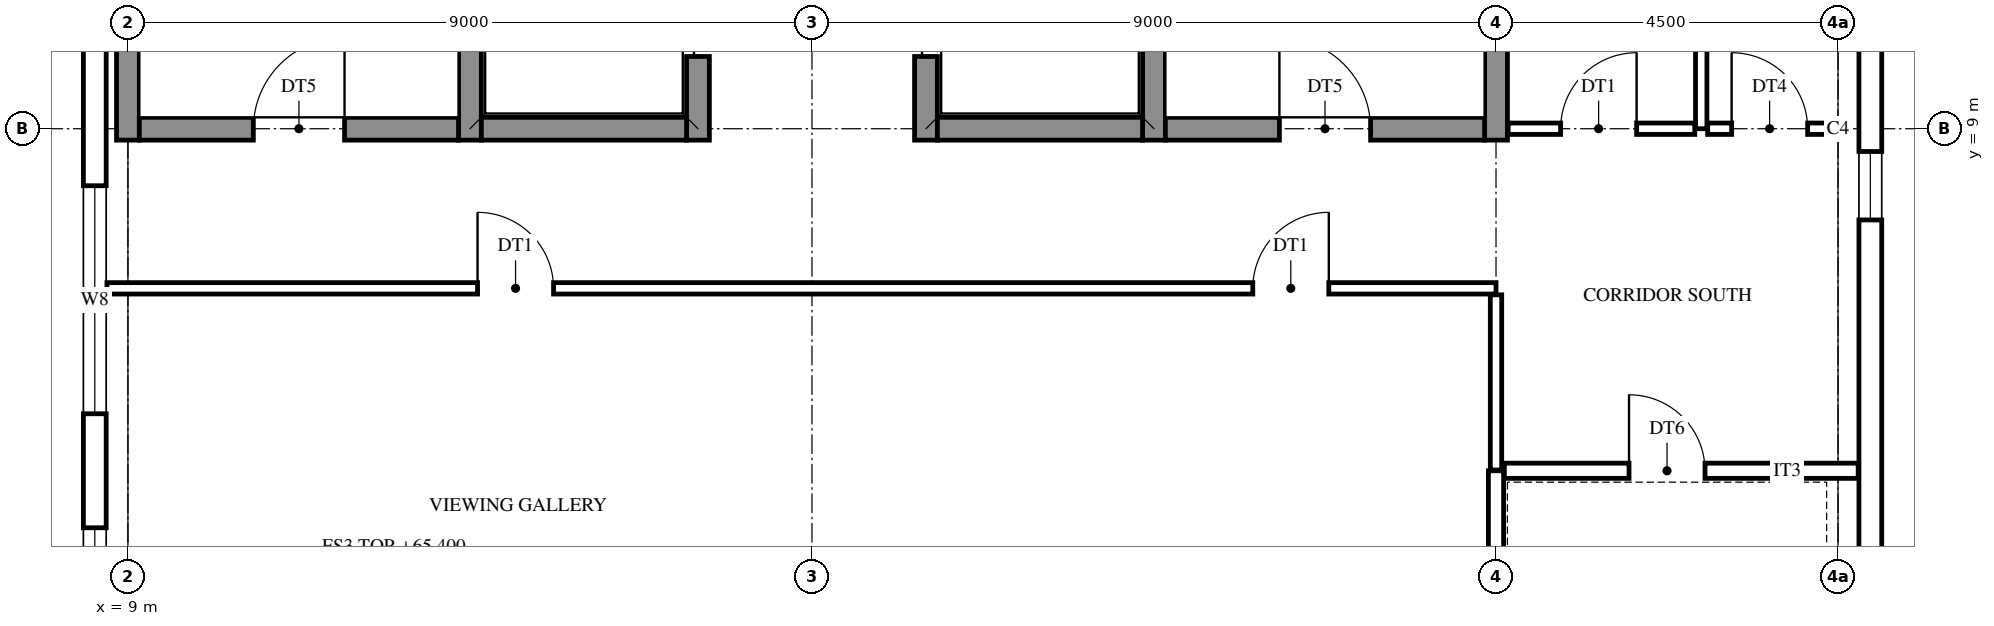
"""IFC4 building model, lengths in metres.
Left out: names, types, materials, properties, quantities, classifications, styles, units other than length and angle.
Written with IfcOpenShell. Run it as: python <this file> out.ifc"""

import sys

from ifc_helpers import new_model, si_unit, direction, frame, frame_2d, origin, origin_2d, place, context, subcontext, project, spatial, rectangle, i_section, extrude, element, fill, save


model = new_model("IFC4")
c1 = context("Model", 3, precision=1e-05, world=origin(), true_north=direction((0.0, 1.0)))
c2 = subcontext(c1, "Body", "Model", "MODEL_VIEW")
j1 = project(units=[si_unit("LENGTHUNIT", "METRE"), si_unit("PLANEANGLEUNIT", "RADIAN")], contexts=[c1])
p1 = place(None, origin())
s1 = spatial("IfcSite", under=j1, at=p1, CompositionType="ELEMENT")
p2 = place(p1, origin())
s2 = spatial("IfcBuilding", under=s1, at=p2, CompositionType="ELEMENT")
p3 = place(p2, frame((0.0, 0.0, 65.4)))
s3 = spatial("IfcBuildingStorey", under=s2, at=p3, CompositionType="ELEMENT", Elevation=65.4)
p4 = place(p3, frame((31.5, 9.0, 0.0), z_axis=(0.0, 0.0, 1.0), x_axis=(1.0, 0.0, 0.0)))
e1 = element("IfcColumn", 1, at=p4, inside=s3, PredefinedType="COLUMN", context=c2, shape_type="SweptSolid", body=[
    extrude(i_section(OverallWidth=0.256, OverallDepth=0.26, WebThickness=0.01, FlangeThickness=0.017, FilletRadius=0.014, at=origin_2d()), origin(), (0.0, 0.0, 1.0), 4.5),
])
for number, where, z_axis, x_axis in (
    (2, (9.0, 8.85, 0.0), (0.0, 0.0, 1.0), (0.0, 1.0, 0.0)),
    (3, (13.5, 8.85, 0.0), (0.0, 0.0, 1.0), (0.0, 1.0, 0.0)),
):
    element("IfcWall", number, at=place(p3, frame(where, z_axis=z_axis, x_axis=x_axis)), inside=s3, PredefinedType="SHEAR", context=c2, shape_type="SweptSolid", body=[
        extrude(rectangle(XDim=9.3, YDim=0.3, at=frame_2d((4.65, 0.0))), origin(), (0.0, 0.0, 1.0), 4.5),
    ])
p5 = place(p3, frame((16.5, 8.85, 0.0), z_axis=(0.0, 0.0, 1.0), x_axis=(0.0, 1.0, 0.0)))
e4 = element("IfcWall", 4, at=p5, inside=s3, PredefinedType="SHEAR", context=c2, shape_type="SweptSolid", body=[
    extrude(rectangle(XDim=9.3, YDim=0.3, at=frame_2d((4.65, 0.0))), origin(), (0.0, 0.0, 1.0), 4.5),
])
p6 = place(p5, frame((1.1, 0.0, 0.0)))
e5 = element("IfcOpeningElement", 5, at=p6, cuts=e4, PredefinedType="OPENING", context=c2, shape_type="SweptSolid", body=[
    extrude(rectangle(XDim=1.1, YDim=2.1, at=frame_2d((0.55, 1.05))), frame((0.0, 0.16, 0.0), z_axis=(0.0, -1.0, 0.0), x_axis=(1.0, 0.0, 0.0)), (0.0, 0.0, 1.0), 0.32),
])
p7 = place(p5, frame((4.1, 0.0, 0.0)))
e6 = element("IfcOpeningElement", 6, at=p7, cuts=e4, PredefinedType="OPENING", context=c2, shape_type="SweptSolid", body=[
    extrude(rectangle(XDim=1.1, YDim=2.1, at=frame_2d((0.55, 1.05))), frame((0.0, 0.16, 0.0), z_axis=(0.0, -1.0, 0.0), x_axis=(1.0, 0.0, 0.0)), (0.0, 0.0, 1.0), 0.32),
])
p8 = place(p5, frame((7.1, 0.0, 0.0)))
e7 = element("IfcOpeningElement", 7, at=p8, cuts=e4, PredefinedType="OPENING", context=c2, shape_type="SweptSolid", body=[
    extrude(rectangle(XDim=1.1, YDim=2.1, at=frame_2d((0.55, 1.05))), frame((0.0, 0.16, 0.0), z_axis=(0.0, -1.0, 0.0), x_axis=(1.0, 0.0, 0.0)), (0.0, 0.0, 1.0), 0.32),
])
p9 = place(p3, frame((19.5, 8.85, 0.0), z_axis=(0.0, 0.0, 1.0), x_axis=(0.0, 1.0, 0.0)))
e8 = element("IfcWall", 8, at=p9, inside=s3, PredefinedType="SHEAR", context=c2, shape_type="SweptSolid", body=[
    extrude(rectangle(XDim=9.3, YDim=0.3, at=frame_2d((4.65, 0.0))), origin(), (0.0, 0.0, 1.0), 4.5),
])
p10 = place(p9, frame((1.1, 0.0, 0.0)))
e9 = element("IfcOpeningElement", 9, at=p10, cuts=e8, PredefinedType="OPENING", context=c2, shape_type="SweptSolid", body=[
    extrude(rectangle(XDim=1.1, YDim=2.1, at=frame_2d((0.55, 1.05))), frame((0.0, 0.16, 0.0), z_axis=(0.0, -1.0, 0.0), x_axis=(1.0, 0.0, 0.0)), (0.0, 0.0, 1.0), 0.32),
])
p11 = place(p9, frame((3.95, 0.0, 0.0)))
e10 = element("IfcOpeningElement", 10, at=p11, cuts=e8, PredefinedType="OPENING", context=c2, shape_type="SweptSolid", body=[
    extrude(rectangle(XDim=1.4, YDim=2.1, at=frame_2d((0.7, 1.05))), frame((0.0, 0.16, 0.0), z_axis=(0.0, -1.0, 0.0), x_axis=(1.0, 0.0, 0.0)), (0.0, 0.0, 1.0), 0.32),
])
p12 = place(p9, frame((7.1, 0.0, 0.0)))
e11 = element("IfcOpeningElement", 11, at=p12, cuts=e8, PredefinedType="OPENING", context=c2, shape_type="SweptSolid", body=[
    extrude(rectangle(XDim=1.1, YDim=2.1, at=frame_2d((0.55, 1.05))), frame((0.0, 0.16, 0.0), z_axis=(0.0, -1.0, 0.0), x_axis=(1.0, 0.0, 0.0)), (0.0, 0.0, 1.0), 0.32),
])
for number, where, z_axis, x_axis in (
    (12, (22.5, 8.85, 0.0), (0.0, 0.0, 1.0), (0.0, 1.0, 0.0)),
    (13, (27.0, 8.85, 0.0), (0.0, 0.0, 1.0), (0.0, 1.0, 0.0)),
):
    element("IfcWall", number, at=place(p3, frame(where, z_axis=z_axis, x_axis=x_axis)), inside=s3, PredefinedType="SHEAR", context=c2, shape_type="SweptSolid", body=[
        extrude(rectangle(XDim=9.3, YDim=0.3, at=frame_2d((4.65, 0.0))), origin(), (0.0, 0.0, 1.0), 4.5),
    ])
p13 = place(p3, frame((9.15, 9.0, 0.0), z_axis=(0.0, 0.0, 1.0), x_axis=(1.0, 0.0, 0.0)))
e14 = element("IfcWall", 14, at=p13, inside=s3, PredefinedType="SHEAR", context=c2, shape_type="SweptSolid", body=[
    extrude(rectangle(XDim=4.2, YDim=0.3, at=frame_2d((2.1, 0.0))), origin(), (0.0, 0.0, 1.0), 4.5),
])
p14 = place(p13, frame((1.5, 0.0, 0.0)))
e15 = element("IfcOpeningElement", 15, at=p14, cuts=e14, PredefinedType="OPENING", context=c2, shape_type="SweptSolid", body=[
    extrude(rectangle(XDim=1.2, YDim=2.1, at=frame_2d((0.6, 1.05))), frame((0.0, 0.16, 0.0), z_axis=(0.0, -1.0, 0.0), x_axis=(1.0, 0.0, 0.0)), (0.0, 0.0, 1.0), 0.32),
])
for number, where, z_axis, x_axis in (
    (16, (13.65, 9.0, 0.0), (0.0, 0.0, 1.0), (1.0, 0.0, 0.0)),
    (17, (19.65, 9.0, 0.0), (0.0, 0.0, 1.0), (1.0, 0.0, 0.0)),
):
    element("IfcWall", number, at=place(p3, frame(where, z_axis=z_axis, x_axis=x_axis)), inside=s3, PredefinedType="SHEAR", context=c2, shape_type="SweptSolid", body=[
        extrude(rectangle(XDim=2.7, YDim=0.3, at=frame_2d((1.35, 0.0))), origin(), (0.0, 0.0, 1.0), 4.5),
    ])
p15 = place(p3, frame((22.65, 9.0, 0.0), z_axis=(0.0, 0.0, 1.0), x_axis=(1.0, 0.0, 0.0)))
e18 = element("IfcWall", 18, at=p15, inside=s3, PredefinedType="SHEAR", context=c2, shape_type="SweptSolid", body=[
    extrude(rectangle(XDim=4.2, YDim=0.3, at=frame_2d((2.1, 0.0))), origin(), (0.0, 0.0, 1.0), 4.5),
])
p16 = place(p15, frame((1.5, 0.0, 0.0)))
e19 = element("IfcOpeningElement", 19, at=p16, cuts=e18, PredefinedType="OPENING", context=c2, shape_type="SweptSolid", body=[
    extrude(rectangle(XDim=1.2, YDim=2.1, at=frame_2d((0.6, 1.05))), frame((0.0, 0.16, 0.0), z_axis=(0.0, -1.0, 0.0), x_axis=(1.0, 0.0, 0.0)), (0.0, 0.0, 1.0), 0.32),
])
p17 = place(p3, frame((8.564, -0.286, 0.0), z_axis=(0.0, 0.0, 1.0), x_axis=(0.0, 1.0, 0.0)))
e20 = element("IfcWall", 20, at=p17, inside=s3, PredefinedType="STANDARD", context=c2, shape_type="SweptSolid", body=[
    extrude(rectangle(XDim=27.572, YDim=0.3, at=frame_2d((13.786, 0.0))), origin(), (0.0, 0.0, 1.0), 4.5),
])
p18 = place(p17, frame((1.036, 0.0, 0.6)))
e21 = element("IfcOpeningElement", 21, at=p18, cuts=e20, PredefinedType="OPENING", context=c2, shape_type="SweptSolid", body=[
    extrude(rectangle(XDim=3.0, YDim=3.1, at=frame_2d((1.5, 1.55))), frame((0.0, 0.16, 0.0), z_axis=(0.0, -1.0, 0.0), x_axis=(1.0, 0.0, 0.0)), (0.0, 0.0, 1.0), 0.32),
])
p19 = place(p17, frame((5.536, 0.0, 0.6)))
e22 = element("IfcOpeningElement", 22, at=p19, cuts=e20, PredefinedType="OPENING", context=c2, shape_type="SweptSolid", body=[
    extrude(rectangle(XDim=3.0, YDim=3.1, at=frame_2d((1.5, 1.55))), frame((0.0, 0.16, 0.0), z_axis=(0.0, -1.0, 0.0), x_axis=(1.0, 0.0, 0.0)), (0.0, 0.0, 1.0), 0.32),
])
p20 = place(p17, frame((19.036, 0.0, 0.6)))
e23 = element("IfcOpeningElement", 23, at=p20, cuts=e20, PredefinedType="OPENING", context=c2, shape_type="SweptSolid", body=[
    extrude(rectangle(XDim=3.0, YDim=3.1, at=frame_2d((1.5, 1.55))), frame((0.0, 0.16, 0.0), z_axis=(0.0, -1.0, 0.0), x_axis=(1.0, 0.0, 0.0)), (0.0, 0.0, 1.0), 0.32),
])
p21 = place(p17, frame((23.536, 0.0, 0.6)))
e24 = element("IfcOpeningElement", 24, at=p21, cuts=e20, PredefinedType="OPENING", context=c2, shape_type="SweptSolid", body=[
    extrude(rectangle(XDim=3.0, YDim=3.1, at=frame_2d((1.5, 1.55))), frame((0.0, 0.16, 0.0), z_axis=(0.0, -1.0, 0.0), x_axis=(1.0, 0.0, 0.0)), (0.0, 0.0, 1.0), 0.32),
])
p22 = place(p3, frame((31.925, 18.275, 0.0), z_axis=(0.0, 0.0, 1.0), x_axis=(0.0, -1.0, 0.0)))
e25 = element("IfcWall", 25, at=p22, inside=s3, PredefinedType="STANDARD", context=c2, shape_type="SweptSolid", body=[
    extrude(rectangle(XDim=18.55, YDim=0.3, at=frame_2d((9.275, 0.0))), origin(), (0.0, 0.0, 1.0), 4.5),
])
p23 = place(p22, frame((17.075, 0.0, 0.6)))
e26 = element("IfcOpeningElement", 26, at=p23, cuts=e25, PredefinedType="OPENING", context=c2, shape_type="SweptSolid", body=[
    extrude(rectangle(XDim=0.9, YDim=2.3, at=frame_2d((0.45, 1.15))), frame((0.0, 0.16, 0.0), z_axis=(0.0, -1.0, 0.0), x_axis=(1.0, 0.0, 0.0)), (0.0, 0.0, 1.0), 0.32),
])
p24 = place(p22, frame((9.575, 0.0, 0.6)))
e27 = element("IfcOpeningElement", 27, at=p24, cuts=e25, PredefinedType="OPENING", context=c2, shape_type="SweptSolid", body=[
    extrude(rectangle(XDim=0.9, YDim=2.3, at=frame_2d((0.45, 1.15))), frame((0.0, 0.16, 0.0), z_axis=(0.0, -1.0, 0.0), x_axis=(1.0, 0.0, 0.0)), (0.0, 0.0, 1.0), 0.32),
])
p25 = place(p22, frame((6.725, 0.0, 1.6)))
e28 = element("IfcOpeningElement", 28, at=p25, cuts=e25, PredefinedType="OPENING", context=c2, shape_type="SweptSolid", body=[
    extrude(rectangle(XDim=0.6, YDim=0.9, at=frame_2d((0.3, 0.45))), frame((0.0, 0.16, 0.0), z_axis=(0.0, -1.0, 0.0), x_axis=(1.0, 0.0, 0.0)), (0.0, 0.0, 1.0), 0.32),
])
p26 = place(p22, frame((2.225, 0.0, 1.6)))
e29 = element("IfcOpeningElement", 29, at=p26, cuts=e25, PredefinedType="OPENING", context=c2, shape_type="SweptSolid", body=[
    extrude(rectangle(XDim=0.6, YDim=0.9, at=frame_2d((0.3, 0.45))), frame((0.0, 0.16, 0.0), z_axis=(0.0, -1.0, 0.0), x_axis=(1.0, 0.0, 0.0)), (0.0, 0.0, 1.0), 0.32),
])
p27 = place(p3, frame((27.0, 0.14, 0.0), z_axis=(0.0, 0.0, 1.0), x_axis=(0.0, 1.0, 0.0)))
e30 = element("IfcWall", 30, at=p27, inside=s3, PredefinedType="PARTITIONING", context=c2, shape_type="SweptSolid", body=[
    extrude(rectangle(XDim=4.36, YDim=0.2, at=frame_2d((2.18, 0.0))), origin(), (0.0, 0.0, 1.0), 3.723),
])
p28 = place(p3, frame((27.0, 4.51, 0.0), z_axis=(0.0, 0.0, 1.0), x_axis=(0.0, 1.0, 0.0)))
e31 = element("IfcWall", 31, at=p28, inside=s3, PredefinedType="PARTITIONING", context=c2, shape_type="SweptSolid", body=[
    extrude(rectangle(XDim=2.305, YDim=0.15, at=frame_2d((1.152, 0.0))), origin(), (0.0, 0.0, 1.0), 3.723),
])
p29 = place(p3, frame((29.7, 9.0, 0.0), z_axis=(0.0, 0.0, 1.0), x_axis=(0.0, 1.0, 0.0)))
e32 = element("IfcWall", 32, at=p29, inside=s3, PredefinedType="PARTITIONING", context=c2, shape_type="SweptSolid", body=[
    extrude(rectangle(XDim=6.3, YDim=0.15, at=frame_2d((3.15, 0.0))), origin(), (0.0, 0.0, 1.0), 3.723),
])
p30 = place(p29, frame((4.0, 0.0, 0.0)))
e33 = element("IfcOpeningElement", 33, at=p30, cuts=e32, PredefinedType="OPENING", context=c2, shape_type="SweptSolid", body=[
    extrude(rectangle(XDim=1.0, YDim=2.1, at=frame_2d((0.5, 1.05))), frame((0.0, 0.085, 0.0), z_axis=(0.0, -1.0, 0.0), x_axis=(1.0, 0.0, 0.0)), (0.0, 0.0, 1.0), 0.17),
])
p31 = place(p3, frame((27.11, 4.5, 0.0), z_axis=(0.0, 0.0, 1.0), x_axis=(1.0, 0.0, 0.0)))
e34 = element("IfcWall", 34, at=p31, inside=s3, PredefinedType="PARTITIONING", context=c2, shape_type="SweptSolid", body=[
    extrude(rectangle(XDim=4.655, YDim=0.2, at=frame_2d((2.327, 0.0))), origin(), (0.0, 0.0, 1.0), 3.723),
])
p32 = place(p31, frame((1.64, 0.0, 0.0)))
e35 = element("IfcOpeningElement", 35, at=p32, cuts=e34, PredefinedType="OPENING", context=c2, shape_type="SweptSolid", body=[
    extrude(rectangle(XDim=1.0, YDim=2.1, at=frame_2d((0.5, 1.05))), frame((0.0, 0.11, 0.0), z_axis=(0.0, -1.0, 0.0), x_axis=(1.0, 0.0, 0.0)), (0.0, 0.0, 1.0), 0.22),
])
p33 = place(p3, frame((8.724, 6.9, 0.0), z_axis=(0.0, 0.0, 1.0), x_axis=(1.0, 0.0, 0.0)))
e36 = element("IfcWall", 36, at=p33, inside=s3, PredefinedType="PARTITIONING", context=c2, shape_type="SweptSolid", body=[
    extrude(rectangle(XDim=18.276, YDim=0.15, at=frame_2d((9.138, 0.0))), origin(), (0.0, 0.0, 1.0), 3.723),
])
p34 = place(p33, frame((15.076, 0.0, 0.0)))
e37 = element("IfcOpeningElement", 37, at=p34, cuts=e36, PredefinedType="OPENING", context=c2, shape_type="SweptSolid", body=[
    extrude(rectangle(XDim=1.0, YDim=2.1, at=frame_2d((0.5, 1.05))), frame((0.0, 0.085, 0.0), z_axis=(0.0, -1.0, 0.0), x_axis=(1.0, 0.0, 0.0)), (0.0, 0.0, 1.0), 0.17),
])
p35 = place(p33, frame((4.876, 0.0, 0.0)))
e38 = element("IfcOpeningElement", 38, at=p35, cuts=e36, PredefinedType="OPENING", context=c2, shape_type="SweptSolid", body=[
    extrude(rectangle(XDim=1.0, YDim=2.1, at=frame_2d((0.5, 1.05))), frame((0.0, 0.085, 0.0), z_axis=(0.0, -1.0, 0.0), x_axis=(1.0, 0.0, 0.0)), (0.0, 0.0, 1.0), 0.17),
])
p36 = place(p3, frame((27.16, 9.0, 0.0), z_axis=(0.0, 0.0, 1.0), x_axis=(1.0, 0.0, 0.0)))
e39 = element("IfcWall", 39, at=p36, inside=s3, PredefinedType="PARTITIONING", context=c2, shape_type="SweptSolid", body=[
    extrude(rectangle(XDim=2.455, YDim=0.15, at=frame_2d((1.228, 0.0))), origin(), (0.0, 0.0, 1.0), 3.723),
])
p37 = place(p36, frame((0.69, 0.0, 0.0)))
e40 = element("IfcOpeningElement", 40, at=p37, cuts=e39, PredefinedType="OPENING", context=c2, shape_type="SweptSolid", body=[
    extrude(rectangle(XDim=1.0, YDim=2.1, at=frame_2d((0.5, 1.05))), frame((0.0, 0.085, 0.0), z_axis=(0.0, -1.0, 0.0), x_axis=(1.0, 0.0, 0.0)), (0.0, 0.0, 1.0), 0.17),
])
p38 = place(p3, frame((29.785, 9.0, 0.0), z_axis=(0.0, 0.0, 1.0), x_axis=(1.0, 0.0, 0.0)))
e41 = element("IfcWall", 41, at=p38, inside=s3, PredefinedType="PARTITIONING", context=c2, shape_type="SweptSolid", body=[
    extrude(rectangle(XDim=1.577, YDim=0.15, at=frame_2d((0.789, 0.0))), origin(), (0.0, 0.0, 1.0), 3.723),
])
p39 = place(p38, frame((0.315, 0.0, 0.0)))
e42 = element("IfcOpeningElement", 42, at=p39, cuts=e41, PredefinedType="OPENING", context=c2, shape_type="SweptSolid", body=[
    extrude(rectangle(XDim=1.0, YDim=2.1, at=frame_2d((0.5, 1.05))), frame((0.0, 0.085, 0.0), z_axis=(0.0, -1.0, 0.0), x_axis=(1.0, 0.0, 0.0)), (0.0, 0.0, 1.0), 0.17),
])
p40 = place(p18, origin())
e43 = element("IfcWindow", 43, at=p40, inside=s3, PartitioningType="SINGLE_PANEL", PredefinedType="WINDOW", context=c2, shape_type="SweptSolid", body=[
    extrude(rectangle(XDim=3.0, YDim=3.1, at=frame_2d((1.5, 1.55))), frame((0.0, 0.03, 0.0), z_axis=(0.0, -1.0, 0.0), x_axis=(1.0, 0.0, 0.0)), (0.0, 0.0, 1.0), 0.06),
])
fill(e21, e43)
p41 = place(p19, origin())
e44 = element("IfcWindow", 44, at=p41, inside=s3, PartitioningType="SINGLE_PANEL", PredefinedType="WINDOW", context=c2, shape_type="SweptSolid", body=[
    extrude(rectangle(XDim=3.0, YDim=3.1, at=frame_2d((1.5, 1.55))), frame((0.0, 0.03, 0.0), z_axis=(0.0, -1.0, 0.0), x_axis=(1.0, 0.0, 0.0)), (0.0, 0.0, 1.0), 0.06),
])
fill(e22, e44)
p42 = place(p24, origin())
e45 = element("IfcWindow", 45, at=p42, inside=s3, PartitioningType="SINGLE_PANEL", PredefinedType="WINDOW", context=c2, shape_type="SweptSolid", body=[
    extrude(rectangle(XDim=0.9, YDim=2.3, at=frame_2d((0.45, 1.15))), frame((0.0, 0.03, 0.0), z_axis=(0.0, -1.0, 0.0), x_axis=(1.0, 0.0, 0.0)), (0.0, 0.0, 1.0), 0.06),
])
fill(e27, e45)
p43 = place(p14, origin())
e46 = element("IfcDoor", 46, at=p43, inside=s3, OperationType="SINGLE_SWING_RIGHT", PredefinedType="DOOR", context=c2, shape_type="SweptSolid", body=[
    extrude(rectangle(XDim=1.2, YDim=2.1, at=frame_2d((0.6, 1.05))), frame((0.0, 0.025, 0.0), z_axis=(0.0, -1.0, 0.0), x_axis=(1.0, 0.0, 0.0)), (0.0, 0.0, 1.0), 0.05),
])
fill(e15, e46)
p44 = place(p16, origin())
e47 = element("IfcDoor", 47, at=p44, inside=s3, OperationType="SINGLE_SWING_LEFT", PredefinedType="DOOR", context=c2, shape_type="SweptSolid", body=[
    extrude(rectangle(XDim=1.2, YDim=2.1, at=frame_2d((0.6, 1.05))), frame((0.0, 0.025, 0.0), z_axis=(0.0, -1.0, 0.0), x_axis=(1.0, 0.0, 0.0)), (0.0, 0.0, 1.0), 0.05),
])
fill(e19, e47)
p45 = place(p37, origin())
e48 = element("IfcDoor", 48, at=p45, inside=s3, OperationType="SINGLE_SWING_RIGHT", PredefinedType="DOOR", context=c2, shape_type="SweptSolid", body=[
    extrude(rectangle(XDim=1.0, YDim=2.1, at=frame_2d((0.5, 1.05))), frame((0.0, 0.025, 0.0), z_axis=(0.0, -1.0, 0.0), x_axis=(1.0, 0.0, 0.0)), (0.0, 0.0, 1.0), 0.05),
])
fill(e40, e48)
p46 = place(p39, origin())
e49 = element("IfcDoor", 49, at=p46, inside=s3, OperationType="SINGLE_SWING_LEFT", PredefinedType="DOOR", context=c2, shape_type="SweptSolid", body=[
    extrude(rectangle(XDim=1.0, YDim=2.1, at=frame_2d((0.5, 1.05))), frame((0.0, 0.025, 0.0), z_axis=(0.0, -1.0, 0.0), x_axis=(1.0, 0.0, 0.0)), (0.0, 0.0, 1.0), 0.05),
])
fill(e42, e49)
p47 = place(p32, frame((1.0, 0.0, 0.0), z_axis=(0.0, 0.0, 1.0), x_axis=(-1.0, 0.0, 0.0)))
e50 = element("IfcDoor", 50, at=p47, inside=s3, OperationType="SINGLE_SWING_LEFT", PredefinedType="DOOR", context=c2, shape_type="SweptSolid", body=[
    extrude(rectangle(XDim=1.0, YDim=2.1, at=frame_2d((0.5, 1.05))), frame((0.0, 0.025, 0.0), z_axis=(0.0, -1.0, 0.0), x_axis=(1.0, 0.0, 0.0)), (0.0, 0.0, 1.0), 0.05),
])
fill(e35, e50)
p48 = place(p34, frame((1.0, 0.0, 0.0), z_axis=(0.0, 0.0, 1.0), x_axis=(-1.0, 0.0, 0.0)))
e51 = element("IfcDoor", 51, at=p48, inside=s3, OperationType="SINGLE_SWING_RIGHT", PredefinedType="DOOR", context=c2, shape_type="SweptSolid", body=[
    extrude(rectangle(XDim=1.0, YDim=2.1, at=frame_2d((0.5, 1.05))), frame((0.0, 0.025, 0.0), z_axis=(0.0, -1.0, 0.0), x_axis=(1.0, 0.0, 0.0)), (0.0, 0.0, 1.0), 0.05),
])
fill(e37, e51)
p49 = place(p35, frame((1.0, 0.0, 0.0), z_axis=(0.0, 0.0, 1.0), x_axis=(-1.0, 0.0, 0.0)))
e52 = element("IfcDoor", 52, at=p49, inside=s3, OperationType="SINGLE_SWING_LEFT", PredefinedType="DOOR", context=c2, shape_type="SweptSolid", body=[
    extrude(rectangle(XDim=1.0, YDim=2.1, at=frame_2d((0.5, 1.05))), frame((0.0, 0.025, 0.0), z_axis=(0.0, -1.0, 0.0), x_axis=(1.0, 0.0, 0.0)), (0.0, 0.0, 1.0), 0.05),
])
fill(e38, e52)
p50 = place(p6, origin())
e53 = element("IfcDoor", 53, at=p50, inside=s3, OperationType="DOUBLE_DOOR_SLIDING", PredefinedType="DOOR", context=c2, shape_type="SweptSolid", body=[
    extrude(rectangle(XDim=1.1, YDim=2.1, at=frame_2d((0.55, 1.05))), frame((0.0, 0.025, 0.0), z_axis=(0.0, -1.0, 0.0), x_axis=(1.0, 0.0, 0.0)), (0.0, 0.0, 1.0), 0.05),
])
fill(e5, e53)
p51 = place(p10, origin())
e54 = element("IfcDoor", 54, at=p51, inside=s3, OperationType="DOUBLE_DOOR_SLIDING", PredefinedType="DOOR", context=c2, shape_type="SweptSolid", body=[
    extrude(rectangle(XDim=1.1, YDim=2.1, at=frame_2d((0.55, 1.05))), frame((0.0, 0.025, 0.0), z_axis=(0.0, -1.0, 0.0), x_axis=(1.0, 0.0, 0.0)), (0.0, 0.0, 1.0), 0.05),
])
fill(e9, e54)
save(model, sys.argv[1])
